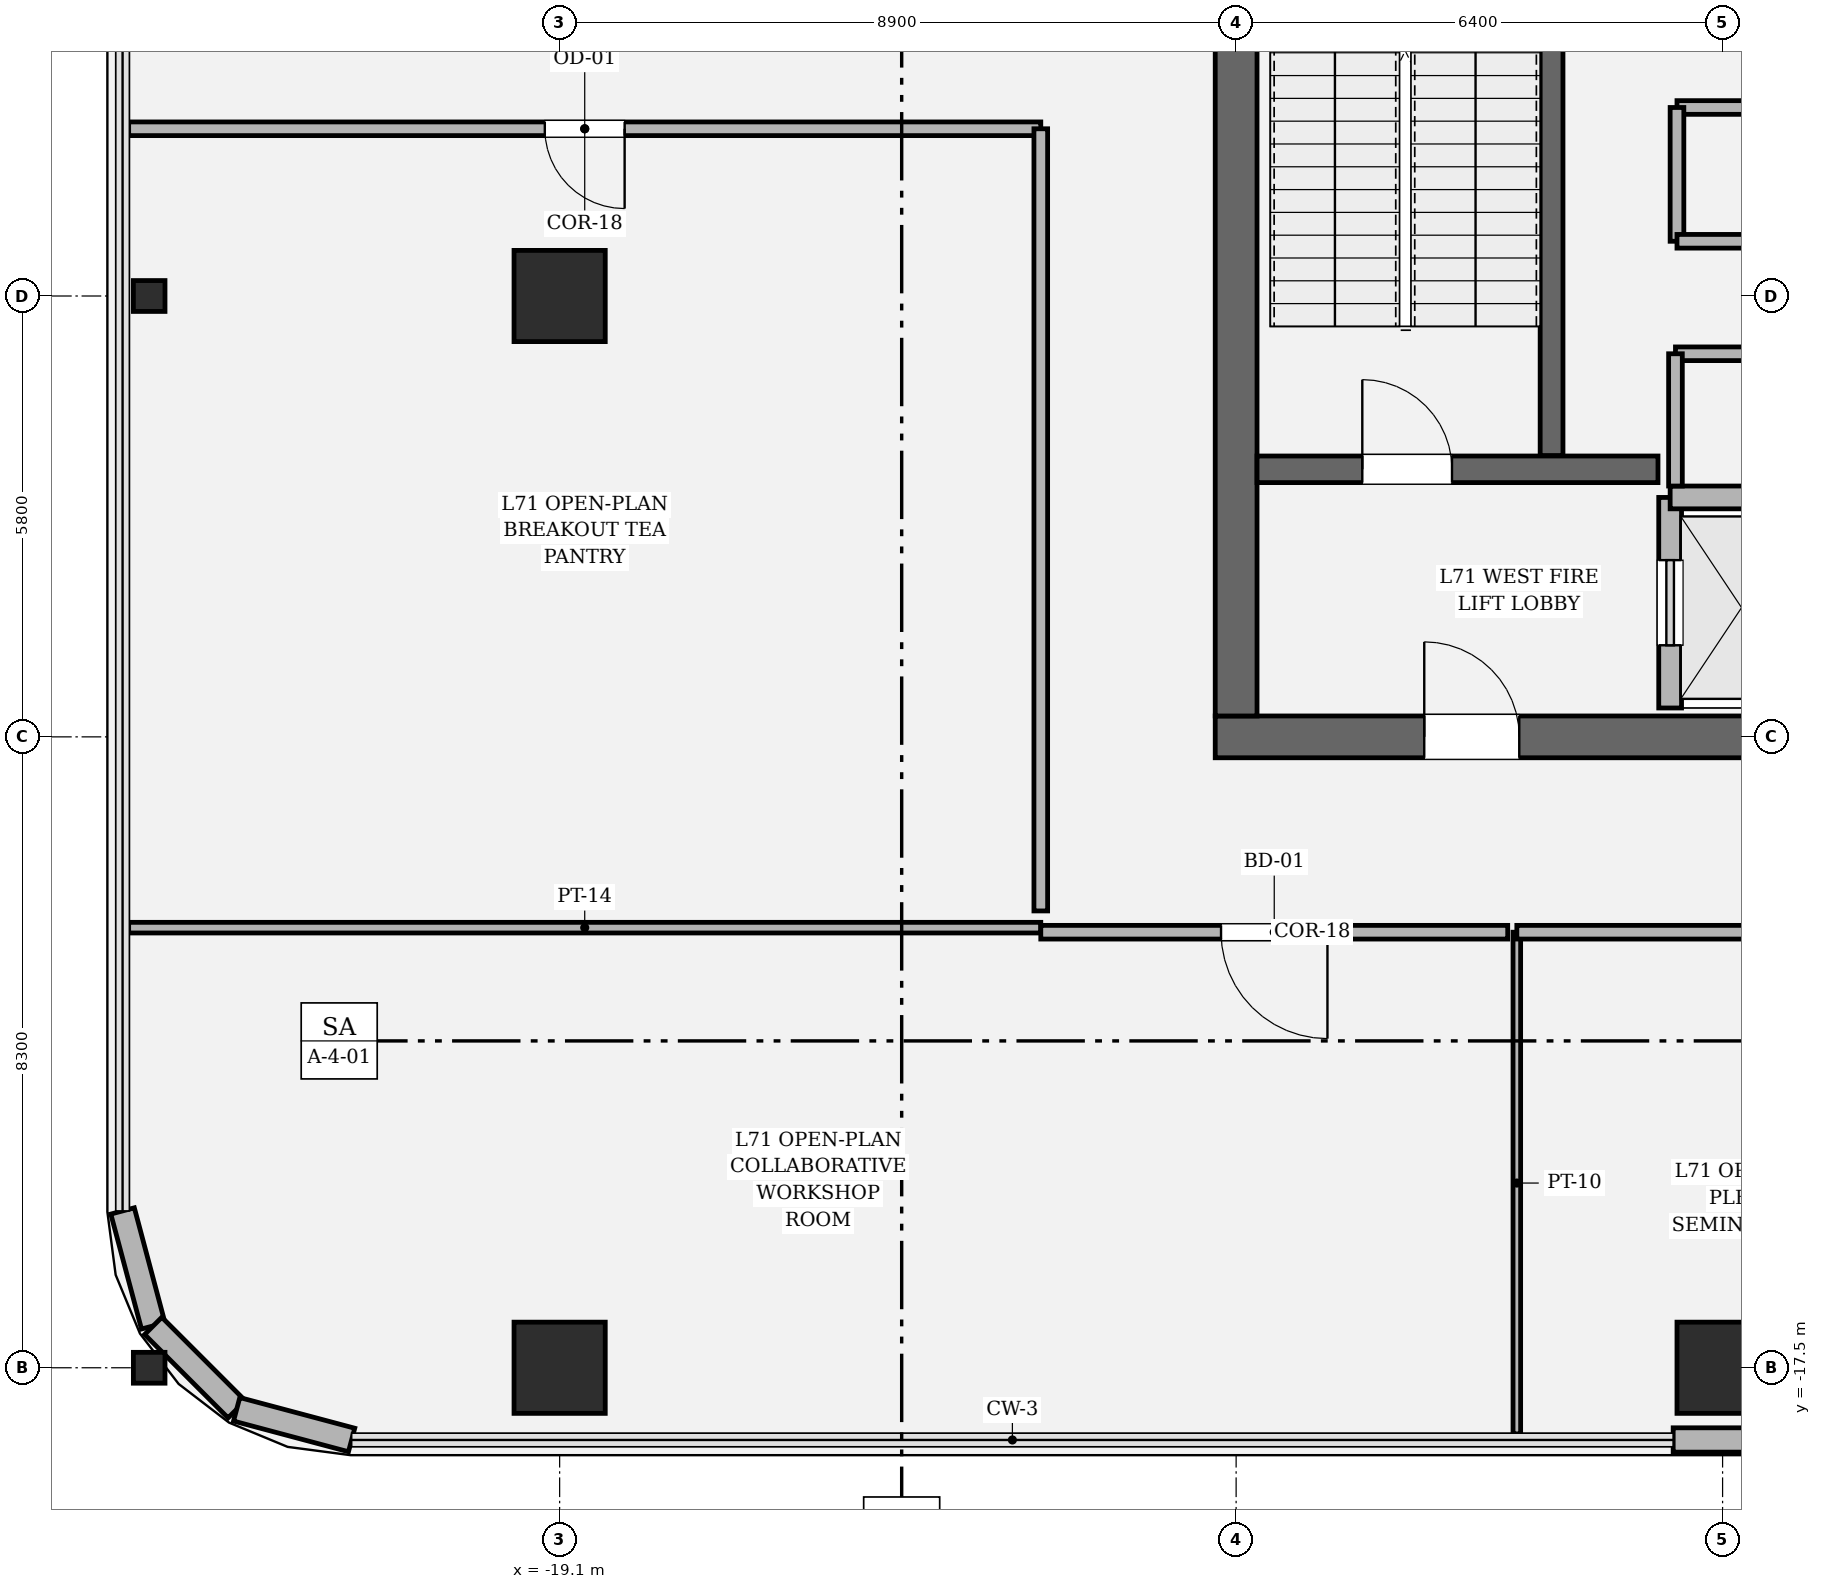
"""IFC4 building model, lengths in metres.
Left out: names, types, materials, properties, quantities, classifications, styles, units other than length and angle.
Written with IfcOpenShell. Run it as: python <this file> out.ifc"""

import sys

from ifc_helpers import new_model, si_unit, direction, frame, frame_2d, origin, origin_2d, place, context, subcontext, project, spatial, rectangle, hollow_rectangle, i_section, extrude, element, fill, save


model = new_model("IFC4")
c1 = context("Model", 3, precision=1e-05, world=origin(), true_north=direction((0.0, 1.0)))
c2 = subcontext(c1, "Body", "Model", "MODEL_VIEW")
j1 = project(units=[si_unit("LENGTHUNIT", "METRE"), si_unit("PLANEANGLEUNIT", "RADIAN")], contexts=[c1])
p1 = place(None, origin())
s1 = spatial("IfcSite", under=j1, at=p1, CompositionType="ELEMENT")
p2 = place(p1, origin())
s2 = spatial("IfcBuilding", under=s1, at=p2, CompositionType="ELEMENT")
p3 = place(p2, frame((0.0, 0.0, 300.6)))
s3 = spatial("IfcBuildingStorey", under=s2, at=p3, CompositionType="ELEMENT", Elevation=300.6)
p4 = place(p3, frame((10.475, -9.2, 0.0), z_axis=(0.0, 0.0, 1.0), x_axis=(-1.0, 0.0, 0.0)))
e1 = element("IfcWall", 1, at=p4, inside=s3, PredefinedType="SHEAR", context=c2, shape_type="SweptSolid", body=[
    extrude(rectangle(XDim=20.95, YDim=0.55, at=frame_2d((10.475, 0.0))), origin(), (0.0, 0.0, 1.0), 4.2),
])
p5 = place(p4, frame((2.75, 0.0, 0.0)))
e2 = element("IfcOpeningElement", 2, at=p5, cuts=e1, PredefinedType="OPENING", context=c2, shape_type="SweptSolid", body=[
    extrude(rectangle(XDim=1.25, YDim=2.25, at=frame_2d((0.625, 1.125))), frame((0.0, 0.285, 0.0), z_axis=(0.0, -1.0, 0.0), x_axis=(1.0, 0.0, 0.0)), (0.0, 0.0, 1.0), 0.57),
])
p6 = place(p4, frame((16.95, 0.0, 0.0)))
e3 = element("IfcOpeningElement", 3, at=p6, cuts=e1, PredefinedType="OPENING", context=c2, shape_type="SweptSolid", body=[
    extrude(rectangle(XDim=1.25, YDim=2.25, at=frame_2d((0.625, 1.125))), frame((0.0, 0.285, 0.0), z_axis=(0.0, -1.0, 0.0), x_axis=(1.0, 0.0, 0.0)), (0.0, 0.0, 1.0), 0.57),
])
p7 = place(p3, frame((-10.2, -8.925, 0.0), z_axis=(0.0, 0.0, 1.0), x_axis=(0.0, 1.0, 0.0)))
e4 = element("IfcWall", 4, at=p7, inside=s3, PredefinedType="SHEAR", context=c2, shape_type="SweptSolid", body=[
    extrude(rectangle(XDim=17.85, YDim=0.55, at=frame_2d((8.925, 0.0))), origin(), (0.0, 0.0, 1.0), 4.2),
])
p8 = place(p7, frame((12.715, 0.0, 0.0)))
e5 = element("IfcOpeningElement", 5, at=p8, cuts=e4, PredefinedType="OPENING", context=c2, shape_type="SweptSolid", body=[
    extrude(rectangle(XDim=1.18, YDim=2.2, at=frame_2d((0.59, 1.1))), frame((0.0, 0.285, 0.0), z_axis=(0.0, -1.0, 0.0), x_axis=(1.0, 0.0, 0.0)), (0.0, 0.0, 1.0), 0.57),
])
p9 = place(p3, frame((-6.05, -5.5, 0.0), z_axis=(0.0, 0.0, 1.0), x_axis=(0.0, 1.0, 0.0)))
e6 = element("IfcWall", 6, at=p9, inside=s3, PredefinedType="SOLIDWALL", context=c2, shape_type="SweptSolid", body=[
    extrude(rectangle(XDim=8.95, YDim=0.3, at=frame_2d((4.475, 0.0))), origin(), (0.0, 0.0, 1.0), 4.2),
])
p10 = place(p3, frame((-9.925, -5.68, 0.0), z_axis=(0.0, 0.0, 1.0), x_axis=(1.0, 0.0, 0.0)))
e7 = element("IfcWall", 7, at=p10, inside=s3, PredefinedType="SOLIDWALL", context=c2, shape_type="SweptSolid", body=[
    extrude(rectangle(XDim=5.275, YDim=0.35, at=frame_2d((2.638, 0.0))), origin(), (0.0, 0.0, 1.0), 4.2),
])
p11 = place(p10, frame((1.385, 0.0, 0.0)))
e8 = element("IfcOpeningElement", 8, at=p11, cuts=e7, PredefinedType="OPENING", context=c2, shape_type="SweptSolid", body=[
    extrude(rectangle(XDim=1.18, YDim=2.2, at=frame_2d((0.59, 1.1))), frame((0.0, 0.185, 0.0), z_axis=(0.0, -1.0, 0.0), x_axis=(1.0, 0.0, 0.0)), (0.0, 0.0, 1.0), 0.37),
])
for number, where, z_axis, x_axis in (
    (9, (-19.1, -17.5, 0.0), (0.0, 0.0, 1.0), (1.0, 0.0, 0.0)),
    (10, (-3.8, -17.5, 0.0), (0.0, 0.0, 1.0), (1.0, 0.0, 0.0)),
    (11, (-19.1, -3.4, 0.0), (0.0, 0.0, 1.0), (1.0, 0.0, 0.0)),
):
    element("IfcColumn", number, at=place(p3, frame(where, z_axis=z_axis, x_axis=x_axis)), inside=s3, PredefinedType="COLUMN", context=c2, shape_type="SweptSolid", body=[
        extrude(hollow_rectangle(XDim=1.2, YDim=1.2, WallThickness=0.035, at=origin_2d()), origin(), (0.0, 0.0, 1.0), 4.2),
    ])
for number, where, z_axis, x_axis in (
    (12, (-24.5, -17.5, 0.0), (0.0, 0.0, 1.0), (0.0, 1.0, 0.0)),
    (13, (-24.5, -3.4, 0.0), (0.0, 0.0, 1.0), (0.0, 1.0, 0.0)),
):
    element("IfcColumn", number, at=place(p3, frame(where, z_axis=z_axis, x_axis=x_axis)), inside=s3, PredefinedType="COLUMN", context=c2, shape_type="SweptSolid", body=[
        extrude(i_section(OverallWidth=0.406, OverallDepth=0.416, WebThickness=0.029, FlangeThickness=0.048, FilletRadius=0.018, at=origin_2d()), origin(), (0.0, 0.0, 1.0), 4.198),
    ])
p12 = place(p3, frame((-4.45, -18.45, 0.0), z_axis=(0.0, 0.0, 1.0), x_axis=(1.0, 0.0, 0.0)))
e14 = element("IfcWall", 14, at=p12, inside=s3, PredefinedType="SOLIDWALL", context=c2, shape_type="SweptSolid", body=[
    extrude(rectangle(XDim=8.9, YDim=0.32, at=frame_2d((4.45, 0.0))), origin(), (0.0, 0.0, 1.0), 4.0),
])
p13 = place(p3, frame((-24.85, -15.437, 0.0), z_axis=(0.0, 0.0, 1.0), x_axis=(0.257847112249, -0.966185730957, 0.0)))
e15 = element("IfcWall", 15, at=p13, inside=s3, PredefinedType="SOLIDWALL", context=c2, shape_type="SweptSolid", body=[
    extrude(rectangle(XDim=1.565, YDim=0.32, at=frame_2d((0.783, 0.0))), origin(), (0.0, 0.0, 1.0), 2.714),
])
p14 = place(p3, frame((-24.447, -16.949, 0.0), z_axis=(0.0, 0.0, 1.0), x_axis=(0.707106781187, -0.707106781187, 0.0)))
e16 = element("IfcWall", 16, at=p14, inside=s3, PredefinedType="SOLIDWALL", context=c2, shape_type="SweptSolid", body=[
    extrude(rectangle(XDim=1.552, YDim=0.32, at=frame_2d((0.776, 0.0))), origin(), (0.0, 0.0, 1.0), 2.674),
])
p15 = place(p3, frame((-23.349, -18.047, 0.0), z_axis=(0.0, 0.0, 1.0), x_axis=(0.966224582397, -0.257701486942, 0.0)))
e17 = element("IfcWall", 17, at=p15, inside=s3, PredefinedType="SOLIDWALL", context=c2, shape_type="SweptSolid", body=[
    extrude(rectangle(XDim=1.565, YDim=0.32, at=frame_2d((0.783, 0.0))), origin(), (0.0, 0.0, 1.0), 4.0),
])
p16 = place(p3, frame((-4.49, -8.82, 0.0), z_axis=(0.0, 0.0, 1.0), x_axis=(0.0, 1.0, 0.0)))
e18 = element("IfcWall", 18, at=p16, inside=s3, PredefinedType="SOLIDWALL", context=c2, shape_type="SweptSolid", body=[
    extrude(rectangle(XDim=2.77, YDim=0.3, at=frame_2d((1.385, 0.0))), origin(), (0.0, 0.0, 1.0), 4.0),
])
p17 = place(p16, frame((0.825, 0.0, 0.0)))
e19 = element("IfcOpeningElement", 19, at=p17, cuts=e18, PredefinedType="OPENING", context=c2, shape_type="SweptSolid", body=[
    extrude(rectangle(XDim=1.12, YDim=2.25, at=frame_2d((0.56, 1.125))), frame((0.0, 0.16, 0.0), z_axis=(0.0, -1.0, 0.0), x_axis=(1.0, 0.0, 0.0)), (0.0, 0.0, 1.0), 0.32),
])
p18 = place(p3, frame((-4.49, -6.05, 0.0), z_axis=(0.0, 0.0, 1.0), x_axis=(1.0, 0.0, 0.0)))
e20 = element("IfcWall", 20, at=p18, inside=s3, PredefinedType="SOLIDWALL", context=c2, shape_type="SweptSolid", body=[
    extrude(rectangle(XDim=1.88, YDim=0.3, at=frame_2d((0.94, 0.0))), origin(), (0.0, 0.0, 1.0), 4.0),
])
p19 = place(p3, frame((-1.58, -4.16, 0.0), z_axis=(0.0, 0.0, 1.0), x_axis=(-1.0, 0.0, 0.0)))
e21 = element("IfcWall", 21, at=p19, inside=s3, PredefinedType="PARTITIONING", context=c2, shape_type="SweptSolid", body=[
    extrude(rectangle(XDim=2.84, YDim=0.18, at=frame_2d((1.42, 0.0))), origin(), (0.0, 0.0, 1.0), 4.0),
])
p20 = place(p19, frame((0.895, 0.0, 0.0)))
e22 = element("IfcOpeningElement", 22, at=p20, cuts=e21, PredefinedType="OPENING", context=c2, shape_type="SweptSolid", body=[
    extrude(rectangle(XDim=1.05, YDim=2.2, at=frame_2d((0.525, 1.1))), frame((0.0, 0.1, 0.0), z_axis=(0.0, -1.0, 0.0), x_axis=(1.0, 0.0, 0.0)), (0.0, 0.0, 1.0), 0.2),
])
p21 = place(p3, frame((-4.42, -4.16, 0.0), z_axis=(0.0, 0.0, 1.0), x_axis=(0.0, -1.0, 0.0)))
e23 = element("IfcWall", 23, at=p21, inside=s3, PredefinedType="PARTITIONING", context=c2, shape_type="SweptSolid", body=[
    extrude(rectangle(XDim=1.74, YDim=0.18, at=frame_2d((0.87, 0.0))), origin(), (0.0, 0.0, 1.0), 4.0),
])
p22 = place(p3, frame((-0.25, -0.92, 0.0), z_axis=(0.0, 0.0, 1.0), x_axis=(-1.0, 0.0, 0.0)))
e24 = element("IfcWall", 24, at=p22, inside=s3, PredefinedType="PARTITIONING", context=c2, shape_type="SweptSolid", body=[
    extrude(rectangle(XDim=4.15, YDim=0.18, at=frame_2d((2.075, 0.0))), origin(), (0.0, 0.0, 1.0), 4.0),
])
p23 = place(p22, frame((1.55, 0.0, 0.0)))
e25 = element("IfcOpeningElement", 25, at=p23, cuts=e24, PredefinedType="OPENING", context=c2, shape_type="SweptSolid", body=[
    extrude(rectangle(XDim=1.05, YDim=2.2, at=frame_2d((0.525, 1.1))), frame((0.0, 0.1, 0.0), z_axis=(0.0, -1.0, 0.0), x_axis=(1.0, 0.0, 0.0)), (0.0, 0.0, 1.0), 0.2),
])
p24 = place(p3, frame((-4.4, -0.92, 0.0), z_axis=(0.0, 0.0, 1.0), x_axis=(0.0, -1.0, 0.0)))
e26 = element("IfcWall", 26, at=p24, inside=s3, PredefinedType="PARTITIONING", context=c2, shape_type="SweptSolid", body=[
    extrude(rectangle(XDim=1.76, YDim=0.18, at=frame_2d((0.88, 0.0))), origin(), (0.0, 0.0, 1.0), 4.0),
])
p25 = place(p3, frame((-4.4, -2.68, 0.0), z_axis=(0.0, 0.0, 1.0), x_axis=(1.0, 0.0, 0.0)))
e27 = element("IfcWall", 27, at=p25, inside=s3, PredefinedType="PARTITIONING", context=c2, shape_type="SweptSolid", body=[
    extrude(rectangle(XDim=4.15, YDim=0.18, at=frame_2d((2.075, 0.0))), origin(), (0.0, 0.0, 1.0), 4.0),
])
p26 = place(p3, frame((-6.507, -18.37, 0.0), z_axis=(0.0, 0.0, 1.0), x_axis=(0.0, 1.0, 0.0)))
e28 = element("IfcWall", 28, at=p26, inside=s3, PredefinedType="PARTITIONING", context=c2, shape_type="SweptSolid", body=[
    extrude(rectangle(XDim=6.6, YDim=0.1, at=frame_2d((3.3, 0.0))), origin(), (0.0, 0.0, 1.0), 3.394),
])
p27 = place(p3, frame((-6.507, -11.77, 0.0), z_axis=(0.0, 0.0, 1.0), x_axis=(1.0, 0.0, 0.0)))
e29 = element("IfcWall", 29, at=p27, inside=s3, PredefinedType="PARTITIONING", context=c2, shape_type="SweptSolid", body=[
    extrude(rectangle(XDim=10.066, YDim=0.18, at=frame_2d((5.033, 0.0))), origin(), (0.0, 0.0, 1.0), 3.394),
])
p28 = place(p27, frame((4.333, 0.0, 0.0)))
e30 = element("IfcOpeningElement", 30, at=p28, cuts=e29, PredefinedType="OPENING", context=c2, shape_type="SweptSolid", body=[
    extrude(rectangle(XDim=1.4, YDim=2.25, at=frame_2d((0.7, 1.125))), frame((0.0, 0.1, 0.0), z_axis=(0.0, -1.0, 0.0), x_axis=(1.0, 0.0, 0.0)), (0.0, 0.0, 1.0), 0.2),
])
p29 = place(p3, frame((-24.77, -11.71, 0.0), z_axis=(0.0, 0.0, 1.0), x_axis=(1.0, 0.0, 0.0)))
e31 = element("IfcWall", 31, at=p29, inside=s3, PredefinedType="PARTITIONING", context=c2, shape_type="SweptSolid", body=[
    extrude(rectangle(XDim=12.0, YDim=0.14, at=frame_2d((6.0, 0.0))), origin(), (0.0, 0.0, 1.0), 2.714),
])
p30 = place(p3, frame((-12.77, -11.77, 0.0), z_axis=(0.0, 0.0, 1.0), x_axis=(1.0, 0.0, 0.0)))
e32 = element("IfcWall", 32, at=p30, inside=s3, PredefinedType="PARTITIONING", context=c2, shape_type="SweptSolid", body=[
    extrude(rectangle(XDim=6.143, YDim=0.18, at=frame_2d((3.072, 0.0))), origin(), (0.0, 0.0, 1.0), 3.394),
])
p31 = place(p30, frame((2.372, 0.0, 0.0)))
e33 = element("IfcOpeningElement", 33, at=p31, cuts=e32, PredefinedType="OPENING", context=c2, shape_type="SweptSolid", body=[
    extrude(rectangle(XDim=1.4, YDim=2.25, at=frame_2d((0.7, 1.125))), frame((0.0, 0.1, 0.0), z_axis=(0.0, -1.0, 0.0), x_axis=(1.0, 0.0, 0.0)), (0.0, 0.0, 1.0), 0.2),
])
p32 = place(p3, frame((-24.77, -1.2, 0.0), z_axis=(0.0, 0.0, 1.0), x_axis=(1.0, 0.0, 0.0)))
e34 = element("IfcWall", 34, at=p32, inside=s3, PredefinedType="PARTITIONING", context=c2, shape_type="SweptSolid", body=[
    extrude(rectangle(XDim=12.0, YDim=0.18, at=frame_2d((6.0, 0.0))), origin(), (0.0, 0.0, 1.0), 2.714),
])
p33 = place(p32, frame((5.475, 0.0, 0.0)))
e35 = element("IfcOpeningElement", 35, at=p33, cuts=e34, PredefinedType="OPENING", context=c2, shape_type="SweptSolid", body=[
    extrude(rectangle(XDim=1.05, YDim=2.2, at=frame_2d((0.525, 1.1))), frame((0.0, 0.1, 0.0), z_axis=(0.0, -1.0, 0.0), x_axis=(1.0, 0.0, 0.0)), (0.0, 0.0, 1.0), 0.2),
])
p34 = place(p3, frame((-12.77, -1.2, 0.0), z_axis=(0.0, 0.0, 1.0), x_axis=(0.0, -1.0, 0.0)))
e36 = element("IfcWall", 36, at=p34, inside=s3, PredefinedType="PARTITIONING", context=c2, shape_type="SweptSolid", body=[
    extrude(rectangle(XDim=10.29, YDim=0.18, at=frame_2d((5.145, 0.0))), origin(), (0.0, 0.0, 1.0), 3.394),
])
p35 = place(p11, origin())
e37 = element("IfcDoor", 37, at=p35, inside=s3, OperationType="SINGLE_SWING_LEFT", PredefinedType="DOOR", context=c2, shape_type="SweptSolid", body=[
    extrude(rectangle(XDim=1.18, YDim=2.2, at=frame_2d((0.59, 1.1))), frame((0.0, 0.025, 0.0), z_axis=(0.0, -1.0, 0.0), x_axis=(1.0, 0.0, 0.0)), (0.0, 0.0, 1.0), 0.05),
])
fill(e8, e37)
p36 = place(p6, origin())
e38 = element("IfcDoor", 38, at=p36, inside=s3, OperationType="SINGLE_SWING_RIGHT", PredefinedType="DOOR", context=c2, shape_type="SweptSolid", body=[
    extrude(rectangle(XDim=1.25, YDim=2.25, at=frame_2d((0.625, 1.125))), frame((0.0, 0.025, 0.0), z_axis=(0.0, -1.0, 0.0), x_axis=(1.0, 0.0, 0.0)), (0.0, 0.0, 1.0), 0.05),
])
fill(e3, e38)
p37 = place(p17, origin())
e39 = element("IfcDoor", 39, at=p37, inside=s3, OperationType="SLIDING_TO_LEFT", PredefinedType="DOOR", context=c2, shape_type="SweptSolid", body=[
    extrude(rectangle(XDim=1.12, YDim=2.25, at=frame_2d((0.56, 1.125))), frame((0.0, 0.025, 0.0), z_axis=(0.0, -1.0, 0.0), x_axis=(1.0, 0.0, 0.0)), (0.0, 0.0, 1.0), 0.05),
])
fill(e19, e39)
p38 = place(p31, origin())
e40 = element("IfcDoor", 40, at=p38, inside=s3, OperationType="SINGLE_SWING_RIGHT", PredefinedType="DOOR", context=c2, shape_type="SweptSolid", body=[
    extrude(rectangle(XDim=1.4, YDim=2.25, at=frame_2d((0.7, 1.125))), frame((0.0, 0.025, 0.0), z_axis=(0.0, -1.0, 0.0), x_axis=(1.0, 0.0, 0.0)), (0.0, 0.0, 1.0), 0.05),
])
fill(e33, e40)
p39 = place(p33, origin())
e41 = element("IfcDoor", 41, at=p39, inside=s3, OperationType="SINGLE_SWING_RIGHT", PredefinedType="DOOR", context=c2, shape_type="SweptSolid", body=[
    extrude(rectangle(XDim=1.05, YDim=2.2, at=frame_2d((0.525, 1.1))), frame((0.0, 0.025, 0.0), z_axis=(0.0, -1.0, 0.0), x_axis=(1.0, 0.0, 0.0)), (0.0, 0.0, 1.0), 0.05),
])
fill(e35, e41)
save(model, sys.argv[1])
